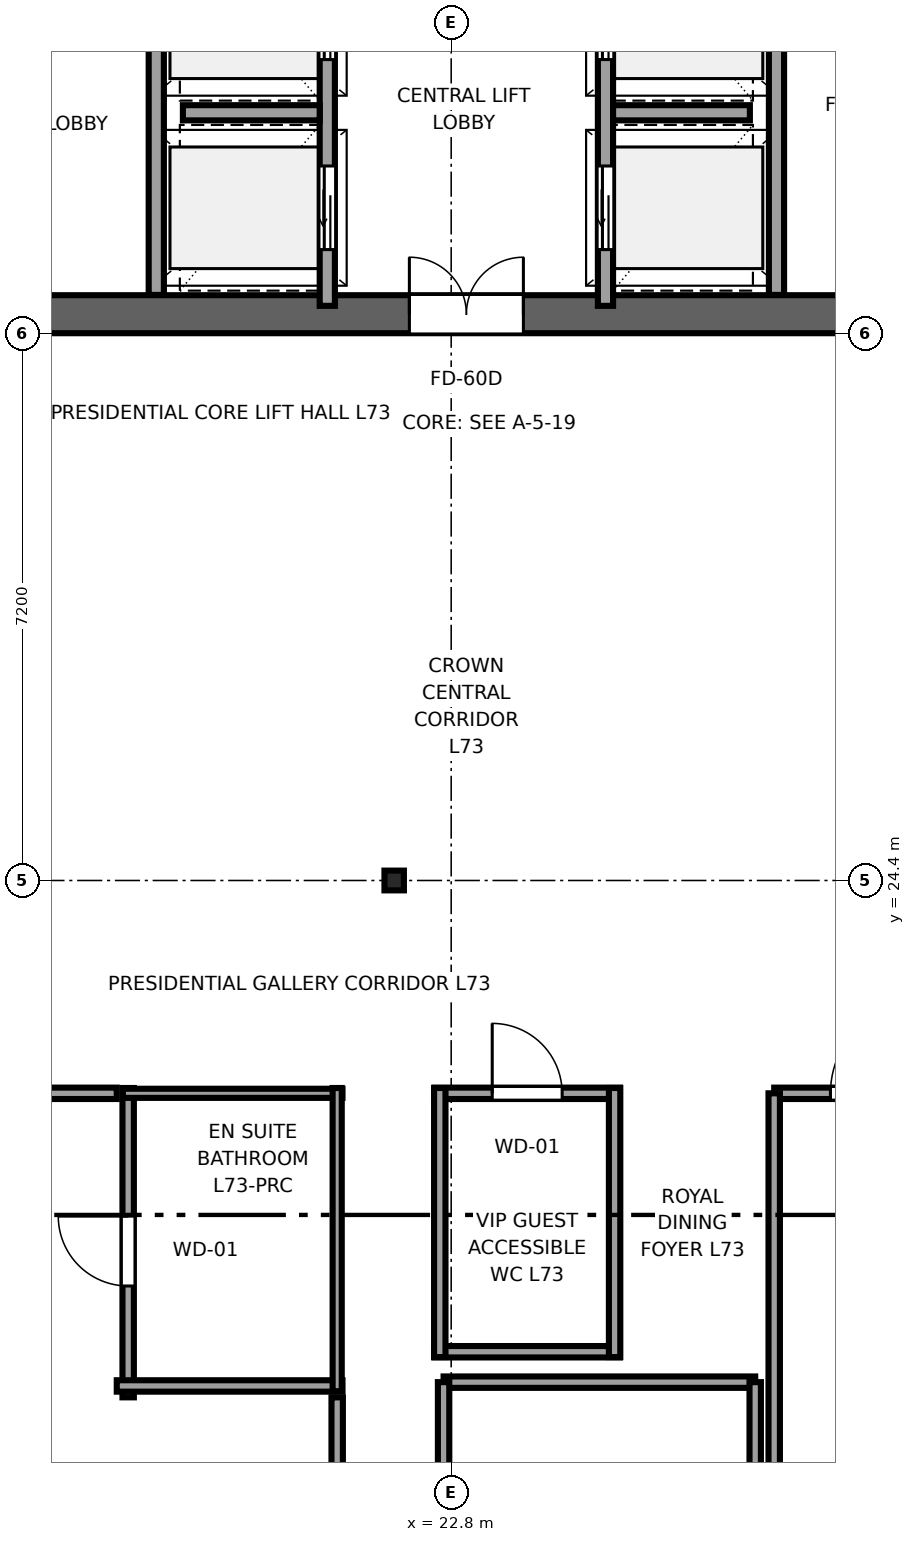
"""IFC4 building model, lengths in metres.
Left out: names, types, materials, properties, quantities, classifications, styles, units other than length and angle.
Written with IfcOpenShell. Run it as: python <this file> out.ifc"""

import sys

from ifc_helpers import new_model, si_unit, direction, frame, frame_2d, origin, origin_2d, place, context, subcontext, project, spatial, rectangle, i_section, extrude, source, transform, mapped, element, fill, save


model = new_model("IFC4")
c1 = context("Model", 3, precision=1e-05, world=origin(), true_north=direction((0.0, 1.0)))
c2 = subcontext(c1, "Body", "Model", "MODEL_VIEW")
j1 = project(units=[si_unit("LENGTHUNIT", "METRE"), si_unit("PLANEANGLEUNIT", "RADIAN")], contexts=[c1])
p1 = place(None, origin())
s1 = spatial("IfcSite", under=j1, at=p1, CompositionType="ELEMENT")
p2 = place(p1, origin())
s2 = spatial("IfcBuilding", under=s1, at=p2, CompositionType="ELEMENT")
p3 = place(p2, frame((0.0, 0.0, 275.05)))
s3 = spatial("IfcBuildingStorey", under=s2, at=p3, CompositionType="ELEMENT", Elevation=275.05)
p4 = place(p3, frame((10.0, 31.85, 0.0), z_axis=(0.0, 0.0, 1.0), x_axis=(1.0, 0.0, 0.0)))
e1 = element("IfcWall", 1, at=p4, inside=s3, PredefinedType="SHEAR", context=c2, shape_type="SweptSolid", body=[
    extrude(rectangle(XDim=26.0, YDim=0.5, at=frame_2d((13.0, 0.0))), origin(), (0.0, 0.0, 1.0), 3.55),
])
p5 = place(p4, frame((7.45, 0.0, 0.0), z_axis=(0.0, 0.0, 1.0), x_axis=(-1.0, 0.0, 0.0)))
e2 = element("IfcOpeningElement", 2, at=p5, cuts=e1, PredefinedType="OPENING", context=c2, shape_type="SweptSolid", body=[
    extrude(rectangle(XDim=1.5, YDim=2.04, at=frame_2d((0.75, 1.02))), frame((0.0, 0.26, 0.0), z_axis=(0.0, -1.0, 0.0), x_axis=(1.0, 0.0, 0.0)), (0.0, 0.0, 1.0), 0.52),
])
p6 = place(p4, frame((13.75, 0.0, 0.0), z_axis=(0.0, 0.0, 1.0), x_axis=(-1.0, 0.0, 0.0)))
e3 = element("IfcOpeningElement", 3, at=p6, cuts=e1, PredefinedType="OPENING", context=c2, shape_type="SweptSolid", body=[
    extrude(rectangle(XDim=1.5, YDim=2.04, at=frame_2d((0.75, 1.02))), frame((0.0, 0.26, 0.0), z_axis=(0.0, -1.0, 0.0), x_axis=(1.0, 0.0, 0.0)), (0.0, 0.0, 1.0), 0.52),
])
p7 = place(p4, frame((20.05, 0.0, 0.0), z_axis=(0.0, 0.0, 1.0), x_axis=(-1.0, 0.0, 0.0)))
e4 = element("IfcOpeningElement", 4, at=p7, cuts=e1, PredefinedType="OPENING", context=c2, shape_type="SweptSolid", body=[
    extrude(rectangle(XDim=1.5, YDim=2.04, at=frame_2d((0.75, 1.02))), frame((0.0, 0.26, 0.0), z_axis=(0.0, -1.0, 0.0), x_axis=(1.0, 0.0, 0.0)), (0.0, 0.0, 1.0), 0.52),
])
m1 = source(origin(), c2, "Body", "SweptSolid", [
    extrude(i_section(OverallWidth=0.256, OverallDepth=0.26, WebThickness=0.01, FlangeThickness=0.017, FilletRadius=0.014, at=origin_2d()), origin(), (0.0, 0.0, 1.0), 3.55),
])
p8 = place(p3, frame((22.05, 24.4, 0.0), z_axis=(0.0, 0.0, 1.0), x_axis=(1.0, 0.0, 0.0)))
e5 = element("IfcColumn", 5, at=p8, inside=s3, PredefinedType="COLUMN", context=c2, shape_type="MappedRepresentation", body=[
    mapped(m1, transform((0.0, 0.0, 0.0), x_axis=(1.0, 0.0, 0.0), y_axis=(0.0, 1.0, 0.0), z_axis=(0.0, 0.0, 1.0), scale=1.0)),
])
for number, where, z_axis, x_axis in (
    (6, (18.92, 32.104, 0.0), (0.0, 0.0, 1.0), (0.0, 1.0, 0.0)),
    (7, (27.08, 32.104, 0.0), (0.0, 0.0, 1.0), (0.0, 1.0, 0.0)),
):
    element("IfcWall", number, at=place(p3, frame(where, z_axis=z_axis, x_axis=x_axis)), inside=s3, PredefinedType="SOLIDWALL", context=c2, shape_type="SweptSolid", body=[
        extrude(rectangle(XDim=4.046, YDim=0.2, at=frame_2d((2.023, 0.0))), origin(), (0.0, 0.0, 1.0), 3.33),
    ])
p9 = place(p3, frame((21.17, 31.96, 0.0), z_axis=(0.0, 0.0, 1.0), x_axis=(0.0, 1.0, 0.0)))
e8 = element("IfcWall", 8, at=p9, inside=s3, PredefinedType="SOLIDWALL", context=c2, shape_type="SweptSolid", body=[
    extrude(rectangle(XDim=5.08, YDim=0.2, at=frame_2d((2.54, 0.0))), origin(), (0.0, 0.0, 1.0), 3.33),
])
p10 = place(p9, frame((0.74, 0.0, 0.0)))
e9 = element("IfcOpeningElement", 9, at=p10, cuts=e8, PredefinedType="OPENING", context=c2, shape_type="SweptSolid", body=[
    extrude(rectangle(XDim=1.1, YDim=2.12, at=frame_2d((0.55, 1.06))), frame((0.0, 0.11, 0.0), z_axis=(0.0, -1.0, 0.0), x_axis=(1.0, 0.0, 0.0)), (0.0, 0.0, 1.0), 0.22),
])
p11 = place(p9, frame((3.24, 0.0, 0.0)))
e10 = element("IfcOpeningElement", 10, at=p11, cuts=e8, PredefinedType="OPENING", context=c2, shape_type="SweptSolid", body=[
    extrude(rectangle(XDim=1.1, YDim=2.12, at=frame_2d((0.55, 1.06))), frame((0.0, 0.11, 0.0), z_axis=(0.0, -1.0, 0.0), x_axis=(1.0, 0.0, 0.0)), (0.0, 0.0, 1.0), 0.22),
])
p12 = place(p3, frame((19.27, 34.5, 0.0), z_axis=(0.0, 0.0, 1.0), x_axis=(1.0, 0.0, 0.0)))
e11 = element("IfcWall", 11, at=p12, inside=s3, PredefinedType="SOLIDWALL", context=c2, shape_type="SweptSolid", body=[
    extrude(rectangle(XDim=1.8, YDim=0.2, at=frame_2d((0.9, 0.0))), origin(), (0.0, 0.0, 1.0), 3.33),
])
p13 = place(p3, frame((24.83, 31.96, 0.0), z_axis=(0.0, 0.0, 1.0), x_axis=(0.0, 1.0, 0.0)))
e12 = element("IfcWall", 12, at=p13, inside=s3, PredefinedType="SOLIDWALL", context=c2, shape_type="SweptSolid", body=[
    extrude(rectangle(XDim=5.08, YDim=0.2, at=frame_2d((2.54, 0.0))), origin(), (0.0, 0.0, 1.0), 3.33),
])
p14 = place(p13, frame((0.74, 0.0, 0.0)))
e13 = element("IfcOpeningElement", 13, at=p14, cuts=e12, PredefinedType="OPENING", context=c2, shape_type="SweptSolid", body=[
    extrude(rectangle(XDim=1.1, YDim=2.12, at=frame_2d((0.55, 1.06))), frame((0.0, 0.11, 0.0), z_axis=(0.0, -1.0, 0.0), x_axis=(1.0, 0.0, 0.0)), (0.0, 0.0, 1.0), 0.22),
])
p15 = place(p13, frame((3.24, 0.0, 0.0)))
e14 = element("IfcOpeningElement", 14, at=p15, cuts=e12, PredefinedType="OPENING", context=c2, shape_type="SweptSolid", body=[
    extrude(rectangle(XDim=1.1, YDim=2.12, at=frame_2d((0.55, 1.06))), frame((0.0, 0.11, 0.0), z_axis=(0.0, -1.0, 0.0), x_axis=(1.0, 0.0, 0.0)), (0.0, 0.0, 1.0), 0.22),
])
p16 = place(p3, frame((24.93, 34.5, 0.0), z_axis=(0.0, 0.0, 1.0), x_axis=(1.0, 0.0, 0.0)))
e15 = element("IfcWall", 15, at=p16, inside=s3, PredefinedType="SOLIDWALL", context=c2, shape_type="SweptSolid", body=[
    extrude(rectangle(XDim=1.8, YDim=0.2, at=frame_2d((0.9, 0.0))), origin(), (0.0, 0.0, 1.0), 3.33),
])
p17 = place(p3, frame((18.55, 17.6, 0.0), z_axis=(0.0, 0.0, 1.0), x_axis=(0.0, 1.0, 0.0)))
e16 = element("IfcWall", 16, at=p17, inside=s3, PredefinedType="PARTITIONING", context=c2, shape_type="SweptSolid", body=[
    extrude(rectangle(XDim=4.07, YDim=0.15, at=frame_2d((2.035, 0.0))), origin(), (0.0, 0.0, 1.0), 3.33),
])
p18 = place(p17, frame((1.465, 0.0, 0.0)))
e17 = element("IfcOpeningElement", 17, at=p18, cuts=e16, PredefinedType="OPENING", context=c2, shape_type="SweptSolid", body=[
    extrude(rectangle(XDim=0.92, YDim=2.01, at=frame_2d((0.46, 1.005))), frame((0.0, 0.085, 0.0), z_axis=(0.0, -1.0, 0.0), x_axis=(1.0, 0.0, 0.0)), (0.0, 0.0, 1.0), 0.17),
])
p19 = place(p3, frame((18.4, 17.75, 0.0), z_axis=(0.0, 0.0, 1.0), x_axis=(1.0, 0.0, 0.0)))
e18 = element("IfcWall", 18, at=p19, inside=s3, PredefinedType="PARTITIONING", context=c2, shape_type="SweptSolid", body=[
    extrude(rectangle(XDim=2.97, YDim=0.15, at=frame_2d((1.485, 0.0))), origin(), (0.0, 0.0, 1.0), 3.33),
])
p20 = place(p3, frame((18.48, 21.6, 0.0), z_axis=(0.0, 0.0, 1.0), x_axis=(1.0, 0.0, 0.0)))
e19 = element("IfcWall", 19, at=p20, inside=s3, PredefinedType="PLUMBINGWALL", context=c2, shape_type="SweptSolid", body=[
    extrude(rectangle(XDim=2.89, YDim=0.12, at=frame_2d((1.445, 0.0))), origin(), (0.0, 0.0, 1.0), 3.33),
])
p21 = place(p3, frame((21.3, 17.68, 0.0), z_axis=(0.0, 0.0, 1.0), x_axis=(0.0, 1.0, 0.0)))
e20 = element("IfcWall", 20, at=p21, inside=s3, PredefinedType="PLUMBINGWALL", context=c2, shape_type="SweptSolid", body=[
    extrude(rectangle(XDim=3.99, YDim=0.12, at=frame_2d((1.995, 0.0))), origin(), (0.0, 0.0, 1.0), 3.33),
])
p22 = place(p3, frame((15.2, 21.6, 0.0), z_axis=(0.0, 0.0, 1.0), x_axis=(1.0, 0.0, 0.0)))
e21 = element("IfcWall", 21, at=p22, inside=s3, PredefinedType="PARTITIONING", context=c2, shape_type="SweptSolid", body=[
    extrude(rectangle(XDim=3.2, YDim=0.15, at=frame_2d((1.6, 0.0))), origin(), (0.0, 0.0, 1.0), 3.33),
])
p23 = place(p22, frame((0.99, 0.0, 0.0)))
e22 = element("IfcOpeningElement", 22, at=p23, cuts=e21, PredefinedType="OPENING", context=c2, shape_type="SweptSolid", body=[
    extrude(rectangle(XDim=1.22, YDim=2.08, at=frame_2d((0.61, 1.04))), frame((0.0, 0.085, 0.0), z_axis=(0.0, -1.0, 0.0), x_axis=(1.0, 0.0, 0.0)), (0.0, 0.0, 1.0), 0.17),
])
p24 = place(p3, frame((21.3, 5.605, 0.0), z_axis=(0.0, 0.0, 1.0), x_axis=(0.0, 1.0, 0.0)))
e23 = element("IfcWall", 23, at=p24, inside=s3, PredefinedType="PARTITIONING", context=c2, shape_type="SweptSolid", body=[
    extrude(rectangle(XDim=11.995, YDim=0.15, at=frame_2d((5.998, 0.0))), origin(), (0.0, 0.0, 1.0), 3.33),
])
p25 = place(p3, frame((22.7, 17.8, 0.0), z_axis=(0.0, 0.0, 1.0), x_axis=(1.0, 0.0, 0.0)))
e24 = element("IfcWall", 24, at=p25, inside=s3, PredefinedType="PARTITIONING", context=c2, shape_type="SweptSolid", body=[
    extrude(rectangle(XDim=4.1, YDim=0.15, at=frame_2d((2.05, 0.0))), origin(), (0.0, 0.0, 1.0), 3.33),
])
p26 = place(p3, frame((22.7, 5.605, 0.0), z_axis=(0.0, 0.0, 1.0), x_axis=(0.0, 1.0, 0.0)))
e25 = element("IfcWall", 25, at=p26, inside=s3, PredefinedType="PARTITIONING", context=c2, shape_type="SweptSolid", body=[
    extrude(rectangle(XDim=12.195, YDim=0.15, at=frame_2d((6.098, 0.0))), origin(), (0.0, 0.0, 1.0), 3.33),
])
p27 = place(p26, frame((5.272, 0.0, 0.0)))
e26 = element("IfcOpeningElement", 26, at=p27, cuts=e25, PredefinedType="OPENING", context=c2, shape_type="SweptSolid", body=[
    extrude(rectangle(XDim=1.65, YDim=2.15, at=frame_2d((0.825, 1.075))), frame((0.0, 0.085, 0.0), z_axis=(0.0, -1.0, 0.0), x_axis=(1.0, 0.0, 0.0)), (0.0, 0.0, 1.0), 0.17),
])
p28 = place(p3, frame((26.8, 5.605, 0.0), z_axis=(0.0, 0.0, 1.0), x_axis=(0.0, 1.0, 0.0)))
e27 = element("IfcWall", 27, at=p28, inside=s3, PredefinedType="PARTITIONING", context=c2, shape_type="SweptSolid", body=[
    extrude(rectangle(XDim=12.195, YDim=0.15, at=frame_2d((6.098, 0.0))), origin(), (0.0, 0.0, 1.0), 3.33),
])
p29 = place(p3, frame((27.05, 21.6, 0.0), z_axis=(0.0, 0.0, 1.0), x_axis=(1.0, 0.0, 0.0)))
e28 = element("IfcWall", 28, at=p29, inside=s3, PredefinedType="PARTITIONING", context=c2, shape_type="SweptSolid", body=[
    extrude(rectangle(XDim=2.7, YDim=0.15, at=frame_2d((1.35, 0.0))), origin(), (0.0, 0.0, 1.0), 3.33),
])
p30 = place(p29, frame((0.74, 0.0, 0.0)))
e29 = element("IfcOpeningElement", 29, at=p30, cuts=e28, PredefinedType="OPENING", context=c2, shape_type="SweptSolid", body=[
    extrude(rectangle(XDim=1.22, YDim=2.08, at=frame_2d((0.61, 1.04))), frame((0.0, 0.085, 0.0), z_axis=(0.0, -1.0, 0.0), x_axis=(1.0, 0.0, 0.0)), (0.0, 0.0, 1.0), 0.17),
])
p31 = place(p3, frame((27.05, 5.605, 0.0), z_axis=(0.0, 0.0, 1.0), x_axis=(0.0, 1.0, 0.0)))
e30 = element("IfcWall", 30, at=p31, inside=s3, PredefinedType="PARTITIONING", context=c2, shape_type="SweptSolid", body=[
    extrude(rectangle(XDim=15.995, YDim=0.15, at=frame_2d((7.998, 0.0))), origin(), (0.0, 0.0, 1.0), 3.33),
])
p32 = place(p3, frame((22.58, 18.2, 0.0), z_axis=(0.0, 0.0, 1.0), x_axis=(1.0, 0.0, 0.0)))
e31 = element("IfcWall", 31, at=p32, inside=s3, PredefinedType="PARTITIONING", context=c2, shape_type="SweptSolid", body=[
    extrude(rectangle(XDim=2.44, YDim=0.15, at=frame_2d((1.22, 0.0))), origin(), (0.0, 0.0, 1.0), 3.33),
])
p33 = place(p3, frame((22.58, 21.6, 0.0), z_axis=(0.0, 0.0, 1.0), x_axis=(1.0, 0.0, 0.0)))
e32 = element("IfcWall", 32, at=p33, inside=s3, PredefinedType="PARTITIONING", context=c2, shape_type="SweptSolid", body=[
    extrude(rectangle(XDim=2.44, YDim=0.15, at=frame_2d((1.22, 0.0))), origin(), (0.0, 0.0, 1.0), 3.33),
])
p34 = place(p33, frame((0.76, 0.0, 0.0)))
e33 = element("IfcOpeningElement", 33, at=p34, cuts=e32, PredefinedType="OPENING", context=c2, shape_type="SweptSolid", body=[
    extrude(rectangle(XDim=0.92, YDim=2.01, at=frame_2d((0.46, 1.005))), frame((0.0, 0.085, 0.0), z_axis=(0.0, -1.0, 0.0), x_axis=(1.0, 0.0, 0.0)), (0.0, 0.0, 1.0), 0.17),
])
for number, where, z_axis, x_axis in (
    (34, (22.65, 18.13, 0.0), (0.0, 0.0, 1.0), (0.0, 1.0, 0.0)),
    (35, (24.95, 18.13, 0.0), (0.0, 0.0, 1.0), (0.0, 1.0, 0.0)),
):
    element("IfcWall", number, at=place(p3, frame(where, z_axis=z_axis, x_axis=x_axis)), inside=s3, PredefinedType="PARTITIONING", context=c2, shape_type="SweptSolid", body=[
        extrude(rectangle(XDim=3.54, YDim=0.15, at=frame_2d((1.77, 0.0))), origin(), (0.0, 0.0, 1.0), 3.33),
    ])
m2 = source(origin(), c2, "Body", "SweptSolid", [
    extrude(rectangle(XDim=1.5, YDim=2.04, at=frame_2d((0.75, 1.02))), frame((0.0, 0.025, 0.0), z_axis=(0.0, -1.0, 0.0), x_axis=(1.0, 0.0, 0.0)), (0.0, 0.0, 1.0), 0.05),
])
p35 = place(p6, origin())
e36 = element("IfcDoor", 36, at=p35, inside=s3, OperationType="DOUBLE_DOOR_SINGLE_SWING", PredefinedType="DOOR", context=c2, shape_type="MappedRepresentation", body=[
    mapped(m2, transform((0.0, 0.0, 0.0), x_axis=(1.0, 0.0, 0.0), y_axis=(0.0, 1.0, 0.0), z_axis=(0.0, 0.0, 1.0), scale=1.0)),
])
fill(e3, e36)
m3 = source(origin(), c2, "Body", "SweptSolid", [
    extrude(rectangle(XDim=1.1, YDim=2.12, at=frame_2d((0.55, 1.06))), frame((0.0, 0.025, 0.0), z_axis=(0.0, -1.0, 0.0), x_axis=(1.0, 0.0, 0.0)), (0.0, 0.0, 1.0), 0.05),
])
p36 = place(p10, origin())
e37 = element("IfcDoor", 37, at=p36, inside=s3, OperationType="SLIDING_TO_LEFT", PredefinedType="DOOR", context=c2, shape_type="MappedRepresentation", body=[
    mapped(m3, transform((0.0, 0.0, 0.0), x_axis=(1.0, 0.0, 0.0), y_axis=(0.0, 1.0, 0.0), z_axis=(0.0, 0.0, 1.0), scale=1.0)),
])
fill(e9, e37)
p37 = place(p11, origin())
e38 = element("IfcDoor", 38, at=p37, inside=s3, OperationType="SLIDING_TO_RIGHT", PredefinedType="DOOR", context=c2, shape_type="MappedRepresentation", body=[
    mapped(m3, transform((0.0, 0.0, 0.0), x_axis=(1.0, 0.0, 0.0), y_axis=(0.0, 1.0, 0.0), z_axis=(0.0, 0.0, 1.0), scale=1.0)),
])
fill(e10, e38)
p38 = place(p14, origin())
e39 = element("IfcDoor", 39, at=p38, inside=s3, OperationType="SLIDING_TO_LEFT", PredefinedType="DOOR", context=c2, shape_type="MappedRepresentation", body=[
    mapped(m3, transform((0.0, 0.0, 0.0), x_axis=(1.0, 0.0, 0.0), y_axis=(0.0, 1.0, 0.0), z_axis=(0.0, 0.0, 1.0), scale=1.0)),
])
fill(e13, e39)
p39 = place(p15, origin())
e40 = element("IfcDoor", 40, at=p39, inside=s3, OperationType="SLIDING_TO_RIGHT", PredefinedType="DOOR", context=c2, shape_type="MappedRepresentation", body=[
    mapped(m3, transform((0.0, 0.0, 0.0), x_axis=(1.0, 0.0, 0.0), y_axis=(0.0, 1.0, 0.0), z_axis=(0.0, 0.0, 1.0), scale=1.0)),
])
fill(e14, e40)
m4 = source(origin(), c2, "Body", "SweptSolid", [
    extrude(rectangle(XDim=0.92, YDim=2.01, at=frame_2d((0.46, 1.005))), frame((0.0, 0.025, 0.0), z_axis=(0.0, -1.0, 0.0), x_axis=(1.0, 0.0, 0.0)), (0.0, 0.0, 1.0), 0.05),
])
p40 = place(p18, origin())
e41 = element("IfcDoor", 41, at=p40, inside=s3, OperationType="SINGLE_SWING_RIGHT", PredefinedType="DOOR", context=c2, shape_type="MappedRepresentation", body=[
    mapped(m4, transform((0.0, 0.0, 0.0), x_axis=(1.0, 0.0, 0.0), y_axis=(0.0, 1.0, 0.0), z_axis=(0.0, 0.0, 1.0), scale=1.0)),
])
fill(e17, e41)
m5 = source(origin(), c2, "Body", "SweptSolid", [
    extrude(rectangle(XDim=1.22, YDim=2.08, at=frame_2d((0.61, 1.04))), frame((0.0, 0.025, 0.0), z_axis=(0.0, -1.0, 0.0), x_axis=(1.0, 0.0, 0.0)), (0.0, 0.0, 1.0), 0.05),
])
p41 = place(p30, origin())
e42 = element("IfcDoor", 42, at=p41, inside=s3, OperationType="SINGLE_SWING_RIGHT", PredefinedType="DOOR", context=c2, shape_type="MappedRepresentation", body=[
    mapped(m5, transform((0.0, 0.0, 0.0), x_axis=(1.0, 0.0, 0.0), y_axis=(0.0, 1.0, 0.0), z_axis=(0.0, 0.0, 1.0), scale=1.0)),
])
fill(e29, e42)
p42 = place(p34, origin())
e43 = element("IfcDoor", 43, at=p42, inside=s3, OperationType="SINGLE_SWING_LEFT", PredefinedType="DOOR", context=c2, shape_type="MappedRepresentation", body=[
    mapped(m4, transform((0.0, 0.0, 0.0), x_axis=(1.0, 0.0, 0.0), y_axis=(0.0, 1.0, 0.0), z_axis=(0.0, 0.0, 1.0), scale=1.0)),
])
fill(e33, e43)
save(model, sys.argv[1])
